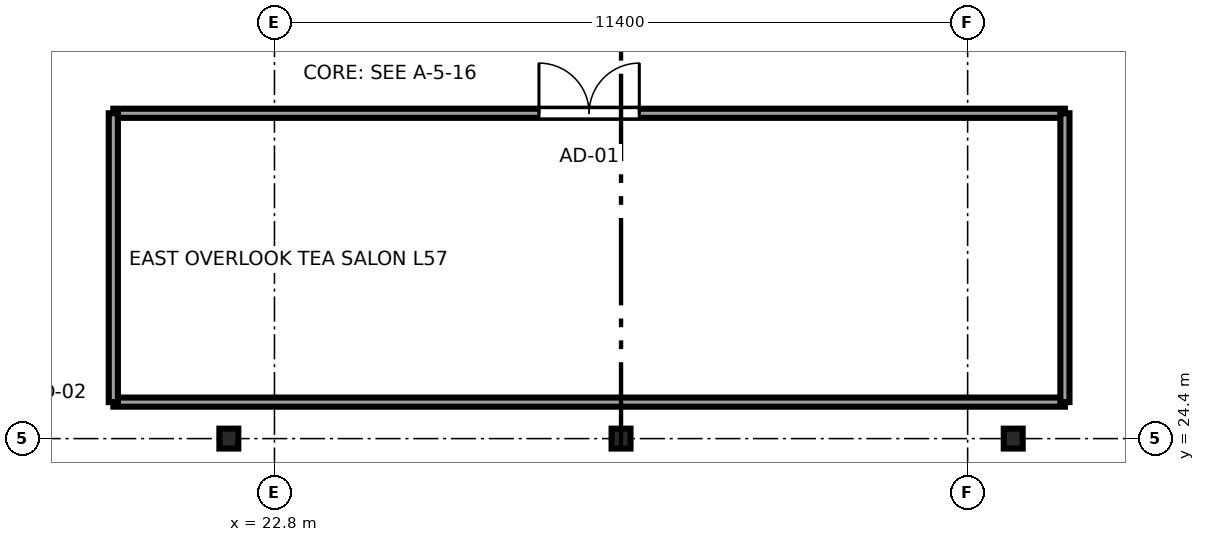
"""IFC4 building model, lengths in metres.
Left out: names, types, materials, properties, quantities, classifications, styles, units other than length and angle.
Written with IfcOpenShell. Run it as: python <this file> out.ifc"""

import sys

from ifc_helpers import new_model, si_unit, direction, frame, frame_2d, origin, origin_2d, place, context, subcontext, project, spatial, rectangle, i_section, extrude, source, transform, mapped, element, fill, save


model = new_model("IFC4")
c1 = context("Model", 3, precision=1e-05, world=origin(), true_north=direction((0.0, 1.0)))
c2 = subcontext(c1, "Body", "Model", "MODEL_VIEW")
j1 = project(units=[si_unit("LENGTHUNIT", "METRE"), si_unit("PLANEANGLEUNIT", "RADIAN")], contexts=[c1])
p1 = place(None, origin())
s1 = spatial("IfcSite", under=j1, at=p1, CompositionType="ELEMENT")
p2 = place(p1, origin())
s2 = spatial("IfcBuilding", under=s1, at=p2, CompositionType="ELEMENT")
p3 = place(p2, frame((0.0, 0.0, 216.8)))
s3 = spatial("IfcBuildingStorey", under=s2, at=p3, CompositionType="ELEMENT", Elevation=216.8)
m1 = source(origin(), c2, "Body", "SweptSolid", [
    extrude(i_section(OverallWidth=0.311, OverallDepth=0.327, WebThickness=0.016, FlangeThickness=0.025, FilletRadius=0.017, at=origin_2d()), origin(), (0.0, 0.0, 1.0), 3.55),
])
for number, where, z_axis, x_axis in (
    (1, (22.05, 24.4, 0.0), (0.0, 0.0, 1.0), (1.0, 0.0, 0.0)),
    (2, (28.5, 24.4, 0.0), (0.0, 0.0, 1.0), (1.0, 0.0, 0.0)),
    (3, (34.95, 24.4, 0.0), (0.0, 0.0, 1.0), (1.0, 0.0, 0.0)),
):
    element("IfcColumn", number, at=place(p3, frame(where, z_axis=z_axis, x_axis=x_axis)), inside=s3, PredefinedType="COLUMN", context=c2, shape_type="MappedRepresentation", body=[
        mapped(m1, transform((0.0, 0.0, 0.0), x_axis=(1.0, 0.0, 0.0), y_axis=(0.0, 1.0, 0.0), z_axis=(0.0, 0.0, 1.0), scale=1.0)),
    ])
p4 = place(p3, frame((20.15, 25.0, 0.0), z_axis=(0.0, 0.0, 1.0), x_axis=(1.0, 0.0, 0.0)))
e4 = element("IfcWall", 4, at=p4, inside=s3, PredefinedType="PARTITIONING", context=c2, shape_type="SweptSolid", body=[
    extrude(rectangle(XDim=15.65, YDim=0.15, at=frame_2d((7.825, 0.0))), origin(), (0.0, 0.0, 1.0), 3.37),
])
p5 = place(p3, frame((20.15, 29.75, 0.0), z_axis=(0.0, 0.0, 1.0), x_axis=(1.0, 0.0, 0.0)))
e5 = element("IfcWall", 5, at=p5, inside=s3, PredefinedType="PARTITIONING", context=c2, shape_type="SweptSolid", body=[
    extrude(rectangle(XDim=15.65, YDim=0.15, at=frame_2d((7.825, 0.0))), origin(), (0.0, 0.0, 1.0), 3.37),
])
p6 = place(p5, frame((7.0, 0.0, 0.0)))
e6 = element("IfcOpeningElement", 6, at=p6, cuts=e5, PredefinedType="OPENING", context=c2, shape_type="SweptSolid", body=[
    extrude(rectangle(XDim=1.65, YDim=2.15, at=frame_2d((0.825, 1.075))), frame((0.0, 0.085, 0.0), z_axis=(0.0, -1.0, 0.0), x_axis=(1.0, 0.0, 0.0)), (0.0, 0.0, 1.0), 0.17),
])
for number, where, z_axis, x_axis in (
    (7, (20.15, 25.0, 0.0), (0.0, 0.0, 1.0), (0.0, 1.0, 0.0)),
    (8, (35.8, 25.0, 0.0), (0.0, 0.0, 1.0), (0.0, 1.0, 0.0)),
):
    element("IfcWall", number, at=place(p3, frame(where, z_axis=z_axis, x_axis=x_axis)), inside=s3, PredefinedType="PARTITIONING", context=c2, shape_type="SweptSolid", body=[
        extrude(rectangle(XDim=4.75, YDim=0.15, at=frame_2d((2.375, 0.0))), origin(), (0.0, 0.0, 1.0), 3.37),
    ])
m2 = source(origin(), c2, "Body", "SweptSolid", [
    extrude(rectangle(XDim=1.65, YDim=2.15, at=frame_2d((0.825, 1.075))), frame((0.0, 0.025, 0.0), z_axis=(0.0, -1.0, 0.0), x_axis=(1.0, 0.0, 0.0)), (0.0, 0.0, 1.0), 0.05),
])
p7 = place(p6, origin())
e9 = element("IfcDoor", 9, at=p7, inside=s3, OperationType="DOUBLE_DOOR_SINGLE_SWING", PredefinedType="DOOR", context=c2, shape_type="MappedRepresentation", body=[
    mapped(m2, transform((0.0, 0.0, 0.0), x_axis=(1.0, 0.0, 0.0), y_axis=(0.0, 1.0, 0.0), z_axis=(0.0, 0.0, 1.0), scale=1.0)),
])
fill(e6, e9)
save(model, sys.argv[1])
